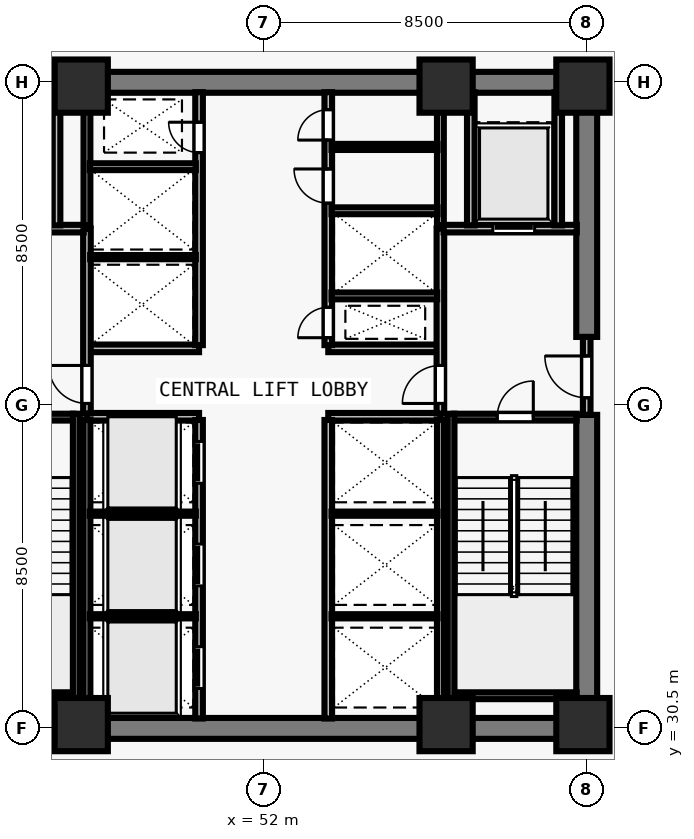
"""IFC4 building model, lengths in metres.
Left out: names, types, materials, properties, quantities, classifications, styles, units other than length and angle.
Written with IfcOpenShell. Run it as: python <this file> out.ifc"""

import sys

from ifc_helpers import new_model, si_unit, direction, frame, frame_2d, origin, origin_2d, place, context, subcontext, project, spatial, rectangle, extrude, element, fill, save


model = new_model("IFC4")
c1 = context("Model", 3, precision=1e-05, world=origin(), true_north=direction((0.0, 1.0)))
c2 = subcontext(c1, "Body", "Model", "MODEL_VIEW")
j1 = project(units=[si_unit("LENGTHUNIT", "METRE"), si_unit("PLANEANGLEUNIT", "RADIAN")], contexts=[c1])
p1 = place(None, origin())
s1 = spatial("IfcSite", under=j1, at=p1, CompositionType="ELEMENT")
p2 = place(p1, origin())
s2 = spatial("IfcBuilding", under=s1, at=p2, CompositionType="ELEMENT")
p3 = place(p2, frame((0.0, 0.0, 10.0)))
s3 = spatial("IfcBuildingStorey", under=s2, at=p3, CompositionType="ELEMENT", Elevation=10.0)
for number, where, z_axis, x_axis in (
    (1, (47.2, 30.6, 0.0), (0.0, 0.0, 1.0), (1.0, 0.0, 0.0)),
    (2, (56.8, 30.6, 0.0), (0.0, 0.0, 1.0), (1.0, 0.0, 0.0)),
    (3, (60.4, 30.6, 0.0), (0.0, 0.0, 1.0), (1.0, 0.0, 0.0)),
    (4, (47.2, 47.4, 0.0), (0.0, 0.0, 1.0), (1.0, 0.0, 0.0)),
    (5, (56.8, 47.4, 0.0), (0.0, 0.0, 1.0), (1.0, 0.0, 0.0)),
    (6, (60.4, 47.4, 0.0), (0.0, 0.0, 1.0), (1.0, 0.0, 0.0)),
):
    element("IfcColumn", number, at=place(p3, frame(where, z_axis=z_axis, x_axis=x_axis)), inside=s3, PredefinedType="COLUMN", context=c2, shape_type="SweptSolid", body=[
        extrude(rectangle(XDim=1.4, YDim=1.4, at=origin_2d()), origin(), (0.0, 0.0, 1.0), 4.5),
    ])
for number, where, z_axis, x_axis in (
    (7, (43.225, 30.5, 0.0), (0.0, 0.0, 1.0), (1.0, 0.0, 0.0)),
    (8, (43.225, 47.5, 0.0), (0.0, 0.0, 1.0), (1.0, 0.0, 0.0)),
):
    element("IfcWall", number, at=place(p3, frame(where, z_axis=z_axis, x_axis=x_axis)), inside=s3, PredefinedType="SHEAR", context=c2, shape_type="SweptSolid", body=[
        extrude(rectangle(XDim=17.55, YDim=0.55, at=frame_2d((8.775, 0.0))), origin(), (0.0, 0.0, 1.0), 4.22),
    ])
p4 = place(p3, frame((60.5, 30.765, 0.0), z_axis=(0.0, 0.0, 1.0), x_axis=(0.0, 1.0, 0.0)))
e9 = element("IfcWall", 9, at=p4, inside=s3, PredefinedType="SHEAR", context=c2, shape_type="SweptSolid", body=[
    extrude(rectangle(XDim=7.985, YDim=0.55, at=frame_2d((3.993, 0.0))), origin(), (0.0, 0.0, 1.0), 4.22),
])
p5 = place(p3, frame((60.5, 40.8, 0.0), z_axis=(0.0, 0.0, 1.0), x_axis=(0.0, 1.0, 0.0)))
e10 = element("IfcWall", 10, at=p5, inside=s3, PredefinedType="SHEAR", context=c2, shape_type="SweptSolid", body=[
    extrude(rectangle(XDim=6.435, YDim=0.55, at=frame_2d((3.218, 0.0))), origin(), (0.0, 0.0, 1.0), 4.22),
])
for number, where, z_axis, x_axis in (
    (11, (47.35, 38.7, 0.0), (0.0, 0.0, 1.0), (1.0, 0.0, 0.0)),
    (12, (47.35, 40.5, 0.0), (0.0, 0.0, 1.0), (1.0, 0.0, 0.0)),
    (13, (53.7, 38.7, 0.0), (0.0, 0.0, 1.0), (1.0, 0.0, 0.0)),
    (14, (53.7, 40.5, 0.0), (0.0, 0.0, 1.0), (1.0, 0.0, 0.0)),
):
    element("IfcWall", number, at=place(p3, frame(where, z_axis=z_axis, x_axis=x_axis)), inside=s3, PredefinedType="SOLIDWALL", context=c2, shape_type="SweptSolid", body=[
        extrude(rectangle(XDim=2.95, YDim=0.2, at=frame_2d((1.475, 0.0))), origin(), (0.0, 0.0, 1.0), 4.22),
    ])
p6 = place(p3, frame((50.3, 30.76, 0.0), z_axis=(0.0, 0.0, 1.0), x_axis=(0.0, 1.0, 0.0)))
e15 = element("IfcWall", 15, at=p6, inside=s3, PredefinedType="SOLIDWALL", context=c2, shape_type="SweptSolid", body=[
    extrude(rectangle(XDim=7.855, YDim=0.2, at=frame_2d((3.927, 0.0))), origin(), (0.0, 0.0, 1.0), 4.22),
])
p7 = place(p6, frame((0.79, 0.0, 0.0)))
e16 = element("IfcOpeningElement", 16, at=p7, cuts=e15, PredefinedType="OPENING", context=c2, shape_type="SweptSolid", body=[
    extrude(rectangle(XDim=1.1, YDim=2.2, at=frame_2d((0.55, 1.1))), frame((0.0, 0.11, 0.0), z_axis=(0.0, -1.0, 0.0), x_axis=(1.0, 0.0, 0.0)), (0.0, 0.0, 1.0), 0.22),
])
p8 = place(p6, frame((3.49, 0.0, 0.0)))
e17 = element("IfcOpeningElement", 17, at=p8, cuts=e15, PredefinedType="OPENING", context=c2, shape_type="SweptSolid", body=[
    extrude(rectangle(XDim=1.1, YDim=2.2, at=frame_2d((0.55, 1.1))), frame((0.0, 0.11, 0.0), z_axis=(0.0, -1.0, 0.0), x_axis=(1.0, 0.0, 0.0)), (0.0, 0.0, 1.0), 0.22),
])
p9 = place(p6, frame((6.19, 0.0, 0.0)))
e18 = element("IfcOpeningElement", 18, at=p9, cuts=e15, PredefinedType="OPENING", context=c2, shape_type="SweptSolid", body=[
    extrude(rectangle(XDim=1.1, YDim=2.2, at=frame_2d((0.55, 1.1))), frame((0.0, 0.11, 0.0), z_axis=(0.0, -1.0, 0.0), x_axis=(1.0, 0.0, 0.0)), (0.0, 0.0, 1.0), 0.22),
])
p10 = place(p3, frame((53.7, 30.76, 0.0), z_axis=(0.0, 0.0, 1.0), x_axis=(0.0, 1.0, 0.0)))
e19 = element("IfcWall", 19, at=p10, inside=s3, PredefinedType="SOLIDWALL", context=c2, shape_type="SweptSolid", body=[
    extrude(rectangle(XDim=7.855, YDim=0.2, at=frame_2d((3.927, 0.0))), origin(), (0.0, 0.0, 1.0), 4.22),
])
p11 = place(p3, frame((50.3, 40.585, 0.0), z_axis=(0.0, 0.0, 1.0), x_axis=(0.0, 1.0, 0.0)))
e20 = element("IfcWall", 20, at=p11, inside=s3, PredefinedType="SOLIDWALL", context=c2, shape_type="SweptSolid", body=[
    extrude(rectangle(XDim=6.655, YDim=0.2, at=frame_2d((3.328, 0.0))), origin(), (0.0, 0.0, 1.0), 4.22),
])
p12 = place(p11, frame((5.065, 0.0, 0.0)))
e21 = element("IfcOpeningElement", 21, at=p12, cuts=e20, PredefinedType="OPENING", context=c2, shape_type="SweptSolid", body=[
    extrude(rectangle(XDim=0.8, YDim=2.08, at=frame_2d((0.4, 1.04))), frame((0.0, 0.11, 0.0), z_axis=(0.0, -1.0, 0.0), x_axis=(1.0, 0.0, 0.0)), (0.0, 0.0, 1.0), 0.22),
])
p13 = place(p3, frame((53.7, 40.585, 0.0), z_axis=(0.0, 0.0, 1.0), x_axis=(0.0, 1.0, 0.0)))
e22 = element("IfcWall", 22, at=p13, inside=s3, PredefinedType="SOLIDWALL", context=c2, shape_type="SweptSolid", body=[
    extrude(rectangle(XDim=6.655, YDim=0.2, at=frame_2d((3.328, 0.0))), origin(), (0.0, 0.0, 1.0), 4.22),
])
p14 = place(p13, frame((0.195, 0.0, 0.0)))
e23 = element("IfcOpeningElement", 23, at=p14, cuts=e22, PredefinedType="OPENING", context=c2, shape_type="SweptSolid", body=[
    extrude(rectangle(XDim=0.8, YDim=2.08, at=frame_2d((0.4, 1.04))), frame((0.0, 0.11, 0.0), z_axis=(0.0, -1.0, 0.0), x_axis=(1.0, 0.0, 0.0)), (0.0, 0.0, 1.0), 0.22),
])
p15 = place(p13, frame((3.735, 0.0, 0.0)))
e24 = element("IfcOpeningElement", 24, at=p15, cuts=e22, PredefinedType="OPENING", context=c2, shape_type="SweptSolid", body=[
    extrude(rectangle(XDim=0.9, YDim=2.12, at=frame_2d((0.45, 1.06))), frame((0.0, 0.11, 0.0), z_axis=(0.0, -1.0, 0.0), x_axis=(1.0, 0.0, 0.0)), (0.0, 0.0, 1.0), 0.22),
])
p16 = place(p13, frame((5.395, 0.0, 0.0)))
e25 = element("IfcOpeningElement", 25, at=p16, cuts=e22, PredefinedType="OPENING", context=c2, shape_type="SweptSolid", body=[
    extrude(rectangle(XDim=0.8, YDim=2.1, at=frame_2d((0.4, 1.05))), frame((0.0, 0.11, 0.0), z_axis=(0.0, -1.0, 0.0), x_axis=(1.0, 0.0, 0.0)), (0.0, 0.0, 1.0), 0.22),
])
p17 = place(p3, frame((47.35, 38.785, 0.0), z_axis=(0.0, 0.0, 1.0), x_axis=(0.0, 1.0, 0.0)))
e26 = element("IfcWall", 26, at=p17, inside=s3, PredefinedType="SOLIDWALL", context=c2, shape_type="SweptSolid", body=[
    extrude(rectangle(XDim=4.865, YDim=0.2, at=frame_2d((2.433, 0.0))), origin(), (0.0, 0.0, 1.0), 4.22),
])
p18 = place(p17, frame((0.265, 0.0, 0.0)))
e27 = element("IfcOpeningElement", 27, at=p18, cuts=e26, PredefinedType="OPENING", context=c2, shape_type="SweptSolid", body=[
    extrude(rectangle(XDim=1.0, YDim=2.15, at=frame_2d((0.5, 1.075))), frame((0.0, 0.11, 0.0), z_axis=(0.0, -1.0, 0.0), x_axis=(1.0, 0.0, 0.0)), (0.0, 0.0, 1.0), 0.22),
])
p19 = place(p3, frame((43.76, 43.65, 0.0), z_axis=(0.0, 0.0, 1.0), x_axis=(1.0, 0.0, 0.0)))
e28 = element("IfcWall", 28, at=p19, inside=s3, PredefinedType="SOLIDWALL", context=c2, shape_type="SweptSolid", body=[
    extrude(rectangle(XDim=3.505, YDim=0.2, at=frame_2d((1.752, 0.0))), origin(), (0.0, 0.0, 1.0), 4.22),
])
p20 = place(p19, frame((1.11, 0.0, 0.0)))
e29 = element("IfcOpeningElement", 29, at=p20, cuts=e28, PredefinedType="OPENING", context=c2, shape_type="SweptSolid", body=[
    extrude(rectangle(XDim=1.1, YDim=2.2, at=frame_2d((0.55, 1.1))), frame((0.0, 0.11, 0.0), z_axis=(0.0, -1.0, 0.0), x_axis=(1.0, 0.0, 0.0)), (0.0, 0.0, 1.0), 0.22),
])
p21 = place(p3, frame((46.55, 43.735, 0.0), z_axis=(0.0, 0.0, 1.0), x_axis=(0.0, 1.0, 0.0)))
e30 = element("IfcWall", 30, at=p21, inside=s3, PredefinedType="SOLIDWALL", context=c2, shape_type="SweptSolid", body=[
    extrude(rectangle(XDim=3.505, YDim=0.2, at=frame_2d((1.752, 0.0))), origin(), (0.0, 0.0, 1.0), 4.22),
])
p22 = place(p3, frame((60.5, 38.75, 0.0), z_axis=(0.0, 0.0, 1.0), x_axis=(0.0, 1.0, 0.0)))
e31 = element("IfcWall", 31, at=p22, inside=s3, PredefinedType="SOLIDWALL", context=c2, shape_type="SweptSolid", body=[
    extrude(rectangle(XDim=2.05, YDim=0.2, at=frame_2d((1.025, 0.0))), origin(), (0.0, 0.0, 1.0), 4.22),
])
p23 = place(p22, frame((0.45, 0.0, 0.0)))
e32 = element("IfcOpeningElement", 32, at=p23, cuts=e31, PredefinedType="OPENING", context=c2, shape_type="SweptSolid", body=[
    extrude(rectangle(XDim=1.1, YDim=2.15, at=frame_2d((0.55, 1.075))), frame((0.0, 0.11, 0.0), z_axis=(0.0, -1.0, 0.0), x_axis=(1.0, 0.0, 0.0)), (0.0, 0.0, 1.0), 0.22),
])
p24 = place(p3, frame((56.65, 38.785, 0.0), z_axis=(0.0, 0.0, 1.0), x_axis=(0.0, 1.0, 0.0)))
e33 = element("IfcWall", 33, at=p24, inside=s3, PredefinedType="SOLIDWALL", context=c2, shape_type="SweptSolid", body=[
    extrude(rectangle(XDim=4.865, YDim=0.2, at=frame_2d((2.433, 0.0))), origin(), (0.0, 0.0, 1.0), 4.22),
])
p25 = place(p24, frame((0.265, 0.0, 0.0)))
e34 = element("IfcOpeningElement", 34, at=p25, cuts=e33, PredefinedType="OPENING", context=c2, shape_type="SweptSolid", body=[
    extrude(rectangle(XDim=1.0, YDim=2.15, at=frame_2d((0.5, 1.075))), frame((0.0, 0.11, 0.0), z_axis=(0.0, -1.0, 0.0), x_axis=(1.0, 0.0, 0.0)), (0.0, 0.0, 1.0), 0.22),
])
p26 = place(p3, frame((56.735, 43.65, 0.0), z_axis=(0.0, 0.0, 1.0), x_axis=(1.0, 0.0, 0.0)))
e35 = element("IfcWall", 35, at=p26, inside=s3, PredefinedType="SOLIDWALL", context=c2, shape_type="SweptSolid", body=[
    extrude(rectangle(XDim=3.505, YDim=0.2, at=frame_2d((1.752, 0.0))), origin(), (0.0, 0.0, 1.0), 4.22),
])
p27 = place(p26, frame((1.295, 0.0, 0.0)))
e36 = element("IfcOpeningElement", 36, at=p27, cuts=e35, PredefinedType="OPENING", context=c2, shape_type="SweptSolid", body=[
    extrude(rectangle(XDim=1.1, YDim=2.2, at=frame_2d((0.55, 1.1))), frame((0.0, 0.11, 0.0), z_axis=(0.0, -1.0, 0.0), x_axis=(1.0, 0.0, 0.0)), (0.0, 0.0, 1.0), 0.22),
])
for number, where, z_axis, x_axis in (
    (37, (57.45, 43.735, 0.0), (0.0, 0.0, 1.0), (0.0, 1.0, 0.0)),
    (38, (59.75, 43.735, 0.0), (0.0, 0.0, 1.0), (0.0, 1.0, 0.0)),
):
    element("IfcWall", number, at=place(p3, frame(where, z_axis=z_axis, x_axis=x_axis)), inside=s3, PredefinedType="SOLIDWALL", context=c2, shape_type="SweptSolid", body=[
        extrude(rectangle(XDim=3.505, YDim=0.2, at=frame_2d((1.752, 0.0))), origin(), (0.0, 0.0, 1.0), 4.22),
    ])
p28 = place(p3, frame((47.35, 30.76, 0.0), z_axis=(0.0, 0.0, 1.0), x_axis=(0.0, 1.0, 0.0)))
e39 = element("IfcWall", 39, at=p28, inside=s3, PredefinedType="SOLIDWALL", context=c2, shape_type="SweptSolid", body=[
    extrude(rectangle(XDim=7.855, YDim=0.18, at=frame_2d((3.927, 0.0))), origin(), (0.0, 0.0, 1.0), 4.22),
])
for number, where, z_axis, x_axis in (
    (40, (47.425, 33.45, 0.0), (0.0, 0.0, 1.0), (1.0, 0.0, 0.0)),
    (41, (47.425, 36.15, 0.0), (0.0, 0.0, 1.0), (1.0, 0.0, 0.0)),
):
    element("IfcWall", number, at=place(p3, frame(where, z_axis=z_axis, x_axis=x_axis)), inside=s3, PredefinedType="PARTITIONING", context=c2, shape_type="SweptSolid", body=[
        extrude(rectangle(XDim=2.79, YDim=0.11, at=frame_2d((1.395, 0.0))), origin(), (0.0, 0.0, 1.0), 4.22),
    ])
p29 = place(p3, frame((56.65, 30.76, 0.0), z_axis=(0.0, 0.0, 1.0), x_axis=(0.0, 1.0, 0.0)))
e42 = element("IfcWall", 42, at=p29, inside=s3, PredefinedType="SOLIDWALL", context=c2, shape_type="SweptSolid", body=[
    extrude(rectangle(XDim=7.855, YDim=0.18, at=frame_2d((3.927, 0.0))), origin(), (0.0, 0.0, 1.0), 4.22),
])
for number, where, z_axis, x_axis in (
    (43, (53.785, 33.45, 0.0), (0.0, 0.0, 1.0), (1.0, 0.0, 0.0)),
    (44, (53.785, 36.15, 0.0), (0.0, 0.0, 1.0), (1.0, 0.0, 0.0)),
):
    element("IfcWall", number, at=place(p3, frame(where, z_axis=z_axis, x_axis=x_axis)), inside=s3, PredefinedType="PARTITIONING", context=c2, shape_type="SweptSolid", body=[
        extrude(rectangle(XDim=2.79, YDim=0.11, at=frame_2d((1.395, 0.0))), origin(), (0.0, 0.0, 1.0), 4.22),
    ])
p30 = place(p3, frame((47.35, 43.735, 0.0), z_axis=(0.0, 0.0, 1.0), x_axis=(0.0, 1.0, 0.0)))
e45 = element("IfcWall", 45, at=p30, inside=s3, PredefinedType="SOLIDWALL", context=c2, shape_type="SweptSolid", body=[
    extrude(rectangle(XDim=3.505, YDim=0.18, at=frame_2d((1.752, 0.0))), origin(), (0.0, 0.0, 1.0), 4.22),
])
p31 = place(p3, frame((47.435, 42.9, 0.0), z_axis=(0.0, 0.0, 1.0), x_axis=(1.0, 0.0, 0.0)))
e46 = element("IfcWall", 46, at=p31, inside=s3, PredefinedType="PARTITIONING", context=c2, shape_type="SweptSolid", body=[
    extrude(rectangle(XDim=2.78, YDim=0.11, at=frame_2d((1.39, 0.0))), origin(), (0.0, 0.0, 1.0), 4.22),
])
p32 = place(p3, frame((47.425, 45.28, 0.0), z_axis=(0.0, 0.0, 1.0), x_axis=(1.0, 0.0, 0.0)))
e47 = element("IfcWall", 47, at=p32, inside=s3, PredefinedType="SOLIDWALL", context=c2, shape_type="SweptSolid", body=[
    extrude(rectangle(XDim=2.79, YDim=0.18, at=frame_2d((1.395, 0.0))), origin(), (0.0, 0.0, 1.0), 4.22),
])
p33 = place(p3, frame((56.65, 43.735, 0.0), z_axis=(0.0, 0.0, 1.0), x_axis=(0.0, 1.0, 0.0)))
e48 = element("IfcWall", 48, at=p33, inside=s3, PredefinedType="SOLIDWALL", context=c2, shape_type="SweptSolid", body=[
    extrude(rectangle(XDim=3.505, YDim=0.18, at=frame_2d((1.752, 0.0))), origin(), (0.0, 0.0, 1.0), 4.22),
])
p34 = place(p3, frame((53.785, 41.88, 0.0), z_axis=(0.0, 0.0, 1.0), x_axis=(1.0, 0.0, 0.0)))
e49 = element("IfcWall", 49, at=p34, inside=s3, PredefinedType="SOLIDWALL", context=c2, shape_type="SweptSolid", body=[
    extrude(rectangle(XDim=2.78, YDim=0.18, at=frame_2d((1.39, 0.0))), origin(), (0.0, 0.0, 1.0), 4.22),
])
p35 = place(p3, frame((53.785, 44.12, 0.0), z_axis=(0.0, 0.0, 1.0), x_axis=(1.0, 0.0, 0.0)))
e50 = element("IfcWall", 50, at=p35, inside=s3, PredefinedType="SOLIDWALL", context=c2, shape_type="SweptSolid", body=[
    extrude(rectangle(XDim=2.79, YDim=0.18, at=frame_2d((1.395, 0.0))), origin(), (0.0, 0.0, 1.0), 4.22),
])
p36 = place(p3, frame((53.785, 45.8, 0.0), z_axis=(0.0, 0.0, 1.0), x_axis=(1.0, 0.0, 0.0)))
e51 = element("IfcWall", 51, at=p36, inside=s3, PredefinedType="PARTITIONING", context=c2, shape_type="SweptSolid", body=[
    extrude(rectangle(XDim=2.79, YDim=0.16, at=frame_2d((1.395, 0.0))), origin(), (0.0, 0.0, 1.0), 4.22),
])
p37 = place(p3, frame((43.765, 38.69, 0.0), z_axis=(0.0, 0.0, 1.0), x_axis=(1.0, 0.0, 0.0)))
e52 = element("IfcWall", 52, at=p37, inside=s3, PredefinedType="SOLIDWALL", context=c2, shape_type="SweptSolid", body=[
    extrude(rectangle(XDim=3.23, YDim=0.18, at=frame_2d((1.615, 0.0))), origin(), (0.0, 0.0, 1.0), 4.22),
])
p38 = place(p37, frame((1.14, 0.0, 0.0)))
e53 = element("IfcOpeningElement", 53, at=p38, cuts=e52, PredefinedType="OPENING", context=c2, shape_type="SweptSolid", body=[
    extrude(rectangle(XDim=0.95, YDim=2.15, at=frame_2d((0.475, 1.075))), frame((0.0, 0.1, 0.0), z_axis=(0.0, -1.0, 0.0), x_axis=(1.0, 0.0, 0.0)), (0.0, 0.0, 1.0), 0.2),
])
p39 = place(p3, frame((43.765, 31.36, 0.0), z_axis=(0.0, 0.0, 1.0), x_axis=(1.0, 0.0, 0.0)))
e54 = element("IfcWall", 54, at=p39, inside=s3, PredefinedType="SOLIDWALL", context=c2, shape_type="SweptSolid", body=[
    extrude(rectangle(XDim=3.23, YDim=0.18, at=frame_2d((1.615, 0.0))), origin(), (0.0, 0.0, 1.0), 4.22),
])
p40 = place(p3, frame((47.07, 38.78, 0.0), z_axis=(0.0, 0.0, 1.0), x_axis=(0.0, -1.0, 0.0)))
e55 = element("IfcWall", 55, at=p40, inside=s3, PredefinedType="SOLIDWALL", context=c2, shape_type="SweptSolid", body=[
    extrude(rectangle(XDim=8.017, YDim=0.18, at=frame_2d((4.009, 0.0))), origin(), (0.0, 0.0, 1.0), 4.22),
])
p41 = place(p3, frame((57.005, 38.69, 0.0), z_axis=(0.0, 0.0, 1.0), x_axis=(1.0, 0.0, 0.0)))
e56 = element("IfcWall", 56, at=p41, inside=s3, PredefinedType="SOLIDWALL", context=c2, shape_type="SweptSolid", body=[
    extrude(rectangle(XDim=3.23, YDim=0.18, at=frame_2d((1.615, 0.0))), origin(), (0.0, 0.0, 1.0), 4.22),
])
p42 = place(p41, frame((1.14, 0.0, 0.0)))
e57 = element("IfcOpeningElement", 57, at=p42, cuts=e56, PredefinedType="OPENING", context=c2, shape_type="SweptSolid", body=[
    extrude(rectangle(XDim=0.95, YDim=2.15, at=frame_2d((0.475, 1.075))), frame((0.0, 0.1, 0.0), z_axis=(0.0, -1.0, 0.0), x_axis=(1.0, 0.0, 0.0)), (0.0, 0.0, 1.0), 0.2),
])
p43 = place(p3, frame((57.005, 31.36, 0.0), z_axis=(0.0, 0.0, 1.0), x_axis=(1.0, 0.0, 0.0)))
e58 = element("IfcWall", 58, at=p43, inside=s3, PredefinedType="SOLIDWALL", context=c2, shape_type="SweptSolid", body=[
    extrude(rectangle(XDim=3.23, YDim=0.18, at=frame_2d((1.615, 0.0))), origin(), (0.0, 0.0, 1.0), 4.22),
])
p44 = place(p3, frame((56.93, 38.78, 0.0), z_axis=(0.0, 0.0, 1.0), x_axis=(0.0, -1.0, 0.0)))
e59 = element("IfcWall", 59, at=p44, inside=s3, PredefinedType="SOLIDWALL", context=c2, shape_type="SweptSolid", body=[
    extrude(rectangle(XDim=8.017, YDim=0.18, at=frame_2d((4.009, 0.0))), origin(), (0.0, 0.0, 1.0), 4.22),
])
p45 = place(p18, origin())
e60 = element("IfcDoor", 60, at=p45, inside=s3, OperationType="SINGLE_SWING_RIGHT", PredefinedType="DOOR", context=c2, shape_type="SweptSolid", body=[
    extrude(rectangle(XDim=1.0, YDim=2.15, at=frame_2d((0.5, 1.075))), frame((0.0, 0.025, 0.0), z_axis=(0.0, -1.0, 0.0), x_axis=(1.0, 0.0, 0.0)), (0.0, 0.0, 1.0), 0.05),
])
fill(e27, e60)
p46 = place(p23, origin())
e61 = element("IfcDoor", 61, at=p46, inside=s3, OperationType="SINGLE_SWING_RIGHT", PredefinedType="DOOR", context=c2, shape_type="SweptSolid", body=[
    extrude(rectangle(XDim=1.1, YDim=2.15, at=frame_2d((0.55, 1.075))), frame((0.0, 0.025, 0.0), z_axis=(0.0, -1.0, 0.0), x_axis=(1.0, 0.0, 0.0)), (0.0, 0.0, 1.0), 0.05),
])
fill(e32, e61)
p47 = place(p25, origin())
e62 = element("IfcDoor", 62, at=p47, inside=s3, OperationType="SINGLE_SWING_LEFT", PredefinedType="DOOR", context=c2, shape_type="SweptSolid", body=[
    extrude(rectangle(XDim=1.0, YDim=2.15, at=frame_2d((0.5, 1.075))), frame((0.0, 0.025, 0.0), z_axis=(0.0, -1.0, 0.0), x_axis=(1.0, 0.0, 0.0)), (0.0, 0.0, 1.0), 0.05),
])
fill(e34, e62)
p48 = place(p27, origin())
e63 = element("IfcDoor", 63, at=p48, inside=s3, OperationType="SLIDING_TO_LEFT", PredefinedType="DOOR", context=c2, shape_type="SweptSolid", body=[
    extrude(rectangle(XDim=1.1, YDim=2.2, at=frame_2d((0.55, 1.1))), frame((0.0, 0.025, 0.0), z_axis=(0.0, -1.0, 0.0), x_axis=(1.0, 0.0, 0.0)), (0.0, 0.0, 1.0), 0.05),
])
fill(e36, e63)
p49 = place(p7, origin())
e64 = element("IfcDoor", 64, at=p49, inside=s3, OperationType="SLIDING_TO_LEFT", PredefinedType="DOOR", context=c2, shape_type="SweptSolid", body=[
    extrude(rectangle(XDim=1.1, YDim=2.2, at=frame_2d((0.55, 1.1))), frame((0.0, 0.025, 0.0), z_axis=(0.0, -1.0, 0.0), x_axis=(1.0, 0.0, 0.0)), (0.0, 0.0, 1.0), 0.05),
])
fill(e16, e64)
p50 = place(p8, origin())
e65 = element("IfcDoor", 65, at=p50, inside=s3, OperationType="SLIDING_TO_LEFT", PredefinedType="DOOR", context=c2, shape_type="SweptSolid", body=[
    extrude(rectangle(XDim=1.1, YDim=2.2, at=frame_2d((0.55, 1.1))), frame((0.0, 0.025, 0.0), z_axis=(0.0, -1.0, 0.0), x_axis=(1.0, 0.0, 0.0)), (0.0, 0.0, 1.0), 0.05),
])
fill(e17, e65)
p51 = place(p9, origin())
e66 = element("IfcDoor", 66, at=p51, inside=s3, OperationType="SLIDING_TO_LEFT", PredefinedType="DOOR", context=c2, shape_type="SweptSolid", body=[
    extrude(rectangle(XDim=1.1, YDim=2.2, at=frame_2d((0.55, 1.1))), frame((0.0, 0.025, 0.0), z_axis=(0.0, -1.0, 0.0), x_axis=(1.0, 0.0, 0.0)), (0.0, 0.0, 1.0), 0.05),
])
fill(e18, e66)
p52 = place(p12, origin())
e67 = element("IfcDoor", 67, at=p52, inside=s3, OperationType="SINGLE_SWING_RIGHT", PredefinedType="DOOR", context=c2, shape_type="SweptSolid", body=[
    extrude(rectangle(XDim=0.8, YDim=2.08, at=frame_2d((0.4, 1.04))), frame((0.0, 0.025, 0.0), z_axis=(0.0, -1.0, 0.0), x_axis=(1.0, 0.0, 0.0)), (0.0, 0.0, 1.0), 0.05),
])
fill(e21, e67)
p53 = place(p14, origin())
e68 = element("IfcDoor", 68, at=p53, inside=s3, OperationType="SINGLE_SWING_LEFT", PredefinedType="DOOR", context=c2, shape_type="SweptSolid", body=[
    extrude(rectangle(XDim=0.8, YDim=2.08, at=frame_2d((0.4, 1.04))), frame((0.0, 0.025, 0.0), z_axis=(0.0, -1.0, 0.0), x_axis=(1.0, 0.0, 0.0)), (0.0, 0.0, 1.0), 0.05),
])
fill(e23, e68)
p54 = place(p15, origin())
e69 = element("IfcDoor", 69, at=p54, inside=s3, OperationType="SINGLE_SWING_RIGHT", PredefinedType="DOOR", context=c2, shape_type="SweptSolid", body=[
    extrude(rectangle(XDim=0.9, YDim=2.12, at=frame_2d((0.45, 1.06))), frame((0.0, 0.025, 0.0), z_axis=(0.0, -1.0, 0.0), x_axis=(1.0, 0.0, 0.0)), (0.0, 0.0, 1.0), 0.05),
])
fill(e24, e69)
p55 = place(p16, origin())
e70 = element("IfcDoor", 70, at=p55, inside=s3, OperationType="SINGLE_SWING_LEFT", PredefinedType="DOOR", context=c2, shape_type="SweptSolid", body=[
    extrude(rectangle(XDim=0.8, YDim=2.1, at=frame_2d((0.4, 1.05))), frame((0.0, 0.025, 0.0), z_axis=(0.0, -1.0, 0.0), x_axis=(1.0, 0.0, 0.0)), (0.0, 0.0, 1.0), 0.05),
])
fill(e25, e70)
p56 = place(p42, origin())
e71 = element("IfcDoor", 71, at=p56, inside=s3, OperationType="SINGLE_SWING_RIGHT", PredefinedType="DOOR", context=c2, shape_type="SweptSolid", body=[
    extrude(rectangle(XDim=0.95, YDim=2.15, at=frame_2d((0.475, 1.075))), frame((0.0, 0.025, 0.0), z_axis=(0.0, -1.0, 0.0), x_axis=(1.0, 0.0, 0.0)), (0.0, 0.0, 1.0), 0.05),
])
fill(e57, e71)
save(model, sys.argv[1])
